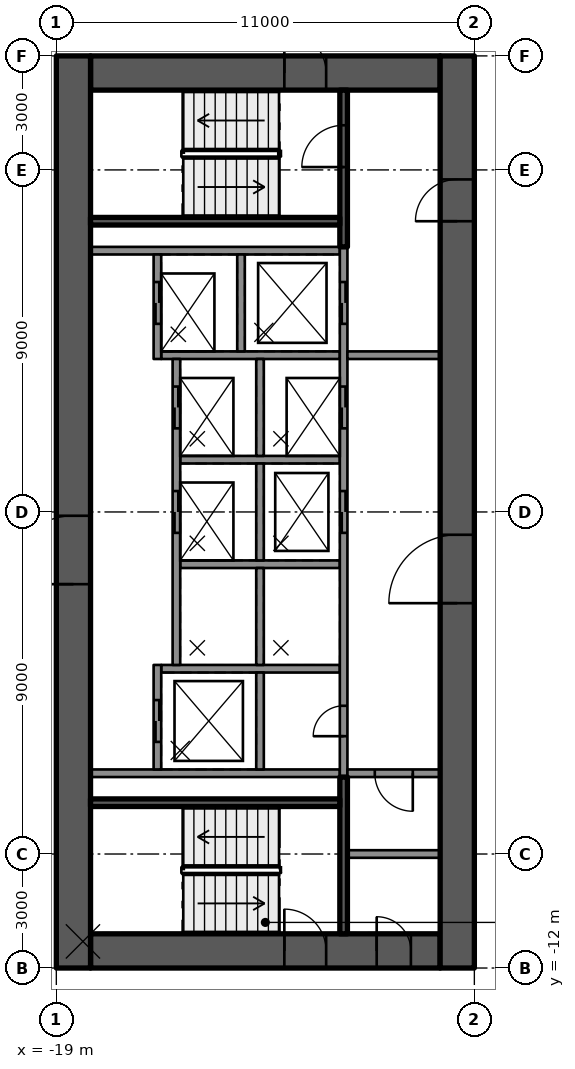
"""IFC4 building model, lengths in metres.
Left out: names, types, materials, properties, quantities, classifications, styles, units other than length and angle.
Written with IfcOpenShell. Run it as: python <this file> out.ifc"""

import sys

from ifc_helpers import new_model, si_unit, direction, frame, frame_2d, origin, place, context, subcontext, project, spatial, rectangle, extrude, element, fill, save


model = new_model("IFC4")
c1 = context("Model", 3, precision=1e-05, world=origin(), true_north=direction((0.0, 1.0)))
c2 = subcontext(c1, "Body", "Model", "MODEL_VIEW")
j1 = project(units=[si_unit("LENGTHUNIT", "METRE"), si_unit("PLANEANGLEUNIT", "RADIAN")], contexts=[c1])
p1 = place(None, origin())
s1 = spatial("IfcSite", under=j1, at=p1, CompositionType="ELEMENT")
p2 = place(p1, origin())
s2 = spatial("IfcBuilding", under=s1, at=p2, CompositionType="ELEMENT")
p3 = place(p2, frame((0.0, 0.0, 40.8)))
s3 = spatial("IfcBuildingStorey", under=s2, at=p3, CompositionType="ELEMENT", Elevation=40.8)
p4 = place(p3, frame((-18.1, 11.55, 0.0), z_axis=(0.0, 0.0, 1.0), x_axis=(1.0, 0.0, 0.0)))
e1 = element("IfcWall", 1, at=p4, inside=s3, PredefinedType="SHEAR", context=c2, shape_type="SweptSolid", body=[
    extrude(rectangle(XDim=9.2, YDim=0.9, at=frame_2d((4.6, 0.0))), origin(), (0.0, 0.0, 1.0), 3.5),
])
p5 = place(p4, frame((5.1, 0.0, 0.0)))
e2 = element("IfcOpeningElement", 2, at=p5, cuts=e1, PredefinedType="OPENING", context=c2, shape_type="SweptSolid", body=[
    extrude(rectangle(XDim=1.1, YDim=2.1, at=frame_2d((0.55, 1.05))), frame((0.0, 0.46, 0.0), z_axis=(0.0, -1.0, 0.0), x_axis=(1.0, 0.0, 0.0)), (0.0, 0.0, 1.0), 0.92),
])
p6 = place(p3, frame((-18.1, -11.55, 0.0), z_axis=(0.0, 0.0, 1.0), x_axis=(1.0, 0.0, 0.0)))
e3 = element("IfcWall", 3, at=p6, inside=s3, PredefinedType="SHEAR", context=c2, shape_type="SweptSolid", body=[
    extrude(rectangle(XDim=9.2, YDim=0.9, at=frame_2d((4.6, 0.0))), origin(), (0.0, 0.0, 1.0), 3.5),
])
p7 = place(p6, frame((5.1, 0.0, 0.0)))
e4 = element("IfcOpeningElement", 4, at=p7, cuts=e3, PredefinedType="OPENING", context=c2, shape_type="SweptSolid", body=[
    extrude(rectangle(XDim=1.1, YDim=2.1, at=frame_2d((0.55, 1.05))), frame((0.0, 0.46, 0.0), z_axis=(0.0, -1.0, 0.0), x_axis=(1.0, 0.0, 0.0)), (0.0, 0.0, 1.0), 0.92),
])
p8 = place(p6, frame((7.53, 0.0, 0.0)))
e5 = element("IfcOpeningElement", 5, at=p8, cuts=e3, PredefinedType="OPENING", context=c2, shape_type="SweptSolid", body=[
    extrude(rectangle(XDim=0.9, YDim=2.1, at=frame_2d((0.45, 1.05))), frame((0.0, 0.46, 0.0), z_axis=(0.0, -1.0, 0.0), x_axis=(1.0, 0.0, 0.0)), (0.0, 0.0, 1.0), 0.92),
])
p9 = place(p3, frame((-18.55, -12.0, 0.0), z_axis=(0.0, 0.0, 1.0), x_axis=(0.0, 1.0, 0.0)))
e6 = element("IfcWall", 6, at=p9, inside=s3, PredefinedType="SHEAR", context=c2, shape_type="SweptSolid", body=[
    extrude(rectangle(XDim=24.0, YDim=0.9, at=frame_2d((12.0, 0.0))), origin(), (0.0, 0.0, 1.0), 3.5),
])
p10 = place(p9, frame((10.1, 0.0, 0.0)))
e7 = element("IfcOpeningElement", 7, at=p10, cuts=e6, PredefinedType="OPENING", context=c2, shape_type="SweptSolid", body=[
    extrude(rectangle(XDim=1.8, YDim=2.1, at=frame_2d((0.9, 1.05))), frame((0.0, 0.46, 0.0), z_axis=(0.0, -1.0, 0.0), x_axis=(1.0, 0.0, 0.0)), (0.0, 0.0, 1.0), 0.92),
])
p11 = place(p3, frame((-8.45, -12.0, 0.0), z_axis=(0.0, 0.0, 1.0), x_axis=(0.0, 1.0, 0.0)))
e8 = element("IfcWall", 8, at=p11, inside=s3, PredefinedType="SHEAR", context=c2, shape_type="SweptSolid", body=[
    extrude(rectangle(XDim=24.0, YDim=0.9, at=frame_2d((12.0, 0.0))), origin(), (0.0, 0.0, 1.0), 3.5),
])
p12 = place(p11, frame((9.6, 0.0, 0.0)))
e9 = element("IfcOpeningElement", 9, at=p12, cuts=e8, PredefinedType="OPENING", context=c2, shape_type="SweptSolid", body=[
    extrude(rectangle(XDim=1.8, YDim=2.1, at=frame_2d((0.9, 1.05))), frame((0.0, 0.46, 0.0), z_axis=(0.0, -1.0, 0.0), x_axis=(1.0, 0.0, 0.0)), (0.0, 0.0, 1.0), 0.92),
])
p13 = place(p11, frame((19.65, 0.0, 0.0)))
e10 = element("IfcOpeningElement", 10, at=p13, cuts=e8, PredefinedType="OPENING", context=c2, shape_type="SweptSolid", body=[
    extrude(rectangle(XDim=1.1, YDim=2.1, at=frame_2d((0.55, 1.05))), frame((0.0, 0.46, 0.0), z_axis=(0.0, -1.0, 0.0), x_axis=(1.0, 0.0, 0.0)), (0.0, 0.0, 1.0), 0.92),
])
for number, where, z_axis, x_axis in (
    (11, (-11.54, 6.875, 0.0), (0.0, 0.0, 1.0), (-1.0, 0.0, 0.0)),
    (12, (-11.54, -6.875, 0.0), (0.0, 0.0, 1.0), (-1.0, 0.0, 0.0)),
):
    element("IfcWall", number, at=place(p3, frame(where, z_axis=z_axis, x_axis=x_axis)), inside=s3, PredefinedType="SOLIDWALL", context=c2, shape_type="SweptSolid", body=[
        extrude(rectangle(XDim=6.56, YDim=0.2, at=frame_2d((3.28, 0.0))), origin(), (0.0, 0.0, 1.0), 3.08),
    ])
p14 = place(p3, frame((-11.54, -4.125, 0.0), z_axis=(0.0, 0.0, 1.0), x_axis=(-1.0, 0.0, 0.0)))
e13 = element("IfcWall", 13, at=p14, inside=s3, PredefinedType="SOLIDWALL", context=c2, shape_type="SweptSolid", body=[
    extrude(rectangle(XDim=4.7, YDim=0.2, at=frame_2d((2.35, 0.0))), origin(), (0.0, 0.0, 1.0), 3.08),
])
for number, where, z_axis, x_axis in (
    (14, (-11.54, -1.375, 0.0), (0.0, 0.0, 1.0), (-1.0, 0.0, 0.0)),
    (15, (-11.54, 1.375, 0.0), (0.0, 0.0, 1.0), (-1.0, 0.0, 0.0)),
):
    element("IfcWall", number, at=place(p3, frame(where, z_axis=z_axis, x_axis=x_axis)), inside=s3, PredefinedType="SOLIDWALL", context=c2, shape_type="SweptSolid", body=[
        extrude(rectangle(XDim=4.2, YDim=0.2, at=frame_2d((2.1, 0.0))), origin(), (0.0, 0.0, 1.0), 3.08),
    ])
p15 = place(p3, frame((-11.54, 4.125, 0.0), z_axis=(0.0, 0.0, 1.0), x_axis=(-1.0, 0.0, 0.0)))
e16 = element("IfcWall", 16, at=p15, inside=s3, PredefinedType="SOLIDWALL", context=c2, shape_type="SweptSolid", body=[
    extrude(rectangle(XDim=4.7, YDim=0.2, at=frame_2d((2.35, 0.0))), origin(), (0.0, 0.0, 1.0), 3.08),
])
p16 = place(p3, frame((-11.44, -6.975, 0.0), z_axis=(0.0, 0.0, 1.0), x_axis=(0.0, 1.0, 0.0)))
e17 = element("IfcWall", 17, at=p16, inside=s3, PredefinedType="SOLIDWALL", context=c2, shape_type="SweptSolid", body=[
    extrude(rectangle(XDim=13.95, YDim=0.2, at=frame_2d((6.975, 0.0))), origin(), (0.0, 0.0, 1.0), 3.08),
])
p17 = place(p16, frame((6.425, 0.0, 0.0)))
e18 = element("IfcOpeningElement", 18, at=p17, cuts=e17, PredefinedType="OPENING", context=c2, shape_type="SweptSolid", body=[
    extrude(rectangle(XDim=1.1, YDim=2.1, at=frame_2d((0.55, 1.05))), frame((0.0, 0.11, 0.0), z_axis=(0.0, -1.0, 0.0), x_axis=(1.0, 0.0, 0.0)), (0.0, 0.0, 1.0), 0.22),
])
p18 = place(p16, frame((9.175, 0.0, 0.0)))
e19 = element("IfcOpeningElement", 19, at=p18, cuts=e17, PredefinedType="OPENING", context=c2, shape_type="SweptSolid", body=[
    extrude(rectangle(XDim=1.1, YDim=2.1, at=frame_2d((0.55, 1.05))), frame((0.0, 0.11, 0.0), z_axis=(0.0, -1.0, 0.0), x_axis=(1.0, 0.0, 0.0)), (0.0, 0.0, 1.0), 0.22),
])
p19 = place(p16, frame((11.925, 0.0, 0.0)))
e20 = element("IfcOpeningElement", 20, at=p19, cuts=e17, PredefinedType="OPENING", context=c2, shape_type="SweptSolid", body=[
    extrude(rectangle(XDim=1.1, YDim=2.1, at=frame_2d((0.55, 1.05))), frame((0.0, 0.11, 0.0), z_axis=(0.0, -1.0, 0.0), x_axis=(1.0, 0.0, 0.0)), (0.0, 0.0, 1.0), 0.22),
])
p20 = place(p16, frame((1.075, 0.0, 0.0)))
e21 = element("IfcOpeningElement", 21, at=p20, cuts=e17, PredefinedType="OPENING", context=c2, shape_type="SweptSolid", body=[
    extrude(rectangle(XDim=0.8, YDim=2.1, at=frame_2d((0.4, 1.05))), frame((0.0, 0.11, 0.0), z_axis=(0.0, -1.0, 0.0), x_axis=(1.0, 0.0, 0.0)), (0.0, 0.0, 1.0), 0.22),
])
for number, where, z_axis, x_axis in (
    (22, (-13.64, -6.775, 0.0), (0.0, 0.0, 1.0), (0.0, 1.0, 0.0)),
    (23, (-13.64, -4.025, 0.0), (0.0, 0.0, 1.0), (0.0, 1.0, 0.0)),
    (24, (-13.64, -1.275, 0.0), (0.0, 0.0, 1.0), (0.0, 1.0, 0.0)),
    (25, (-13.64, 1.475, 0.0), (0.0, 0.0, 1.0), (0.0, 1.0, 0.0)),
    (26, (-14.14, 4.225, 0.0), (0.0, 0.0, 1.0), (0.0, 1.0, 0.0)),
):
    element("IfcWall", number, at=place(p3, frame(where, z_axis=z_axis, x_axis=x_axis)), inside=s3, PredefinedType="SOLIDWALL", context=c2, shape_type="SweptSolid", body=[
        extrude(rectangle(XDim=2.55, YDim=0.2, at=frame_2d((1.275, 0.0))), origin(), (0.0, 0.0, 1.0), 3.08),
    ])
p21 = place(p3, frame((-16.34, -6.775, 0.0), z_axis=(0.0, 0.0, 1.0), x_axis=(0.0, 1.0, 0.0)))
e27 = element("IfcWall", 27, at=p21, inside=s3, PredefinedType="SOLIDWALL", context=c2, shape_type="SweptSolid", body=[
    extrude(rectangle(XDim=2.75, YDim=0.2, at=frame_2d((1.375, 0.0))), origin(), (0.0, 0.0, 1.0), 3.08),
])
p22 = place(p21, frame((0.725, 0.0, 0.0)))
e28 = element("IfcOpeningElement", 28, at=p22, cuts=e27, PredefinedType="OPENING", context=c2, shape_type="SweptSolid", body=[
    extrude(rectangle(XDim=1.1, YDim=2.1, at=frame_2d((0.55, 1.05))), frame((0.0, 0.11, 0.0), z_axis=(0.0, -1.0, 0.0), x_axis=(1.0, 0.0, 0.0)), (0.0, 0.0, 1.0), 0.22),
])
p23 = place(p3, frame((-15.84, -4.025, 0.0), z_axis=(0.0, 0.0, 1.0), x_axis=(0.0, 1.0, 0.0)))
e29 = element("IfcWall", 29, at=p23, inside=s3, PredefinedType="SOLIDWALL", context=c2, shape_type="SweptSolid", body=[
    extrude(rectangle(XDim=8.05, YDim=0.2, at=frame_2d((4.025, 0.0))), origin(), (0.0, 0.0, 1.0), 3.08),
])
p24 = place(p23, frame((3.475, 0.0, 0.0)))
e30 = element("IfcOpeningElement", 30, at=p24, cuts=e29, PredefinedType="OPENING", context=c2, shape_type="SweptSolid", body=[
    extrude(rectangle(XDim=1.1, YDim=2.1, at=frame_2d((0.55, 1.05))), frame((0.0, 0.11, 0.0), z_axis=(0.0, -1.0, 0.0), x_axis=(1.0, 0.0, 0.0)), (0.0, 0.0, 1.0), 0.22),
])
p25 = place(p23, frame((6.225, 0.0, 0.0)))
e31 = element("IfcOpeningElement", 31, at=p25, cuts=e29, PredefinedType="OPENING", context=c2, shape_type="SweptSolid", body=[
    extrude(rectangle(XDim=1.1, YDim=2.1, at=frame_2d((0.55, 1.05))), frame((0.0, 0.11, 0.0), z_axis=(0.0, -1.0, 0.0), x_axis=(1.0, 0.0, 0.0)), (0.0, 0.0, 1.0), 0.22),
])
p26 = place(p3, frame((-16.34, 4.025, 0.0), z_axis=(0.0, 0.0, 1.0), x_axis=(0.0, 1.0, 0.0)))
e32 = element("IfcWall", 32, at=p26, inside=s3, PredefinedType="SOLIDWALL", context=c2, shape_type="SweptSolid", body=[
    extrude(rectangle(XDim=2.75, YDim=0.2, at=frame_2d((1.375, 0.0))), origin(), (0.0, 0.0, 1.0), 3.08),
])
p27 = place(p26, frame((0.925, 0.0, 0.0)))
e33 = element("IfcOpeningElement", 33, at=p27, cuts=e32, PredefinedType="OPENING", context=c2, shape_type="SweptSolid", body=[
    extrude(rectangle(XDim=1.1, YDim=2.1, at=frame_2d((0.55, 1.05))), frame((0.0, 0.11, 0.0), z_axis=(0.0, -1.0, 0.0), x_axis=(1.0, 0.0, 0.0)), (0.0, 0.0, 1.0), 0.22),
])
p28 = place(p3, frame((-11.44, 6.975, 0.0), z_axis=(0.0, 0.0, 1.0), x_axis=(0.0, 1.0, 0.0)))
e34 = element("IfcWall", 34, at=p28, inside=s3, PredefinedType="SOLIDWALL", context=c2, shape_type="SweptSolid", body=[
    extrude(rectangle(XDim=4.125, YDim=0.2, at=frame_2d((2.062, 0.0))), origin(), (0.0, 0.0, 1.0), 3.08),
])
p29 = place(p28, frame((2.1, 0.0, 0.0)))
e35 = element("IfcOpeningElement", 35, at=p29, cuts=e34, PredefinedType="OPENING", context=c2, shape_type="SweptSolid", body=[
    extrude(rectangle(XDim=1.1, YDim=2.1, at=frame_2d((0.55, 1.05))), frame((0.0, 0.11, 0.0), z_axis=(0.0, -1.0, 0.0), x_axis=(1.0, 0.0, 0.0)), (0.0, 0.0, 1.0), 0.22),
])
p30 = place(p3, frame((-11.54, 7.65, 0.0), z_axis=(0.0, 0.0, 1.0), x_axis=(-1.0, 0.0, 0.0)))
e36 = element("IfcWall", 36, at=p30, inside=s3, PredefinedType="SOLIDWALL", context=c2, shape_type="SweptSolid", body=[
    extrude(rectangle(XDim=6.56, YDim=0.2, at=frame_2d((3.28, 0.0))), origin(), (0.0, 0.0, 1.0), 3.08),
])
p31 = place(p3, frame((-11.44, -11.1, 0.0), z_axis=(0.0, 0.0, 1.0), x_axis=(0.0, 1.0, 0.0)))
e37 = element("IfcWall", 37, at=p31, inside=s3, PredefinedType="SOLIDWALL", context=c2, shape_type="SweptSolid", body=[
    extrude(rectangle(XDim=4.125, YDim=0.2, at=frame_2d((2.062, 0.0))), origin(), (0.0, 0.0, 1.0), 3.08),
])
p32 = place(p3, frame((-11.54, -7.65, 0.0), z_axis=(0.0, 0.0, 1.0), x_axis=(-1.0, 0.0, 0.0)))
e38 = element("IfcWall", 38, at=p32, inside=s3, PredefinedType="SOLIDWALL", context=c2, shape_type="SweptSolid", body=[
    extrude(rectangle(XDim=6.56, YDim=0.2, at=frame_2d((3.28, 0.0))), origin(), (0.0, 0.0, 1.0), 3.08),
])
p33 = place(p3, frame((-8.9, 4.125, 0.0), z_axis=(0.0, 0.0, 1.0), x_axis=(-1.0, 0.0, 0.0)))
e39 = element("IfcWall", 39, at=p33, inside=s3, PredefinedType="PARTITIONING", context=c2, shape_type="SweptSolid", body=[
    extrude(rectangle(XDim=2.44, YDim=0.2, at=frame_2d((1.22, 0.0))), origin(), (0.0, 0.0, 1.0), 3.08),
])
p34 = place(p3, frame((-8.9, -6.875, 0.0), z_axis=(0.0, 0.0, 1.0), x_axis=(-1.0, 0.0, 0.0)))
e40 = element("IfcWall", 40, at=p34, inside=s3, PredefinedType="PARTITIONING", context=c2, shape_type="SweptSolid", body=[
    extrude(rectangle(XDim=2.44, YDim=0.2, at=frame_2d((1.22, 0.0))), origin(), (0.0, 0.0, 1.0), 3.08),
])
p35 = place(p34, frame((0.72, 0.0, 0.0)))
e41 = element("IfcOpeningElement", 41, at=p35, cuts=e40, PredefinedType="OPENING", context=c2, shape_type="SweptSolid", body=[
    extrude(rectangle(XDim=1.0, YDim=2.1, at=frame_2d((0.5, 1.05))), frame((0.0, 0.11, 0.0), z_axis=(0.0, -1.0, 0.0), x_axis=(1.0, 0.0, 0.0)), (0.0, 0.0, 1.0), 0.22),
])
p36 = place(p3, frame((-8.9, -9.0, 0.0), z_axis=(0.0, 0.0, 1.0), x_axis=(-1.0, 0.0, 0.0)))
e42 = element("IfcWall", 42, at=p36, inside=s3, PredefinedType="PARTITIONING", context=c2, shape_type="SweptSolid", body=[
    extrude(rectangle(XDim=2.44, YDim=0.2, at=frame_2d((1.22, 0.0))), origin(), (0.0, 0.0, 1.0), 3.08),
])
p37 = place(p22, origin())
e43 = element("IfcDoor", 43, at=p37, inside=s3, OperationType="DOUBLE_DOOR_SLIDING", PredefinedType="DOOR", context=c2, shape_type="SweptSolid", body=[
    extrude(rectangle(XDim=1.1, YDim=2.1, at=frame_2d((0.55, 1.05))), frame((0.0, 0.025, 0.0), z_axis=(0.0, -1.0, 0.0), x_axis=(1.0, 0.0, 0.0)), (0.0, 0.0, 1.0), 0.05),
])
fill(e28, e43)
p38 = place(p17, origin())
e44 = element("IfcDoor", 44, at=p38, inside=s3, OperationType="DOUBLE_DOOR_SLIDING", PredefinedType="DOOR", context=c2, shape_type="SweptSolid", body=[
    extrude(rectangle(XDim=1.1, YDim=2.1, at=frame_2d((0.55, 1.05))), frame((0.0, 0.025, 0.0), z_axis=(0.0, -1.0, 0.0), x_axis=(1.0, 0.0, 0.0)), (0.0, 0.0, 1.0), 0.05),
])
fill(e18, e44)
p39 = place(p24, origin())
e45 = element("IfcDoor", 45, at=p39, inside=s3, OperationType="DOUBLE_DOOR_SLIDING", PredefinedType="DOOR", context=c2, shape_type="SweptSolid", body=[
    extrude(rectangle(XDim=1.1, YDim=2.1, at=frame_2d((0.55, 1.05))), frame((0.0, 0.025, 0.0), z_axis=(0.0, -1.0, 0.0), x_axis=(1.0, 0.0, 0.0)), (0.0, 0.0, 1.0), 0.05),
])
fill(e30, e45)
p40 = place(p18, origin())
e46 = element("IfcDoor", 46, at=p40, inside=s3, OperationType="DOUBLE_DOOR_SLIDING", PredefinedType="DOOR", context=c2, shape_type="SweptSolid", body=[
    extrude(rectangle(XDim=1.1, YDim=2.1, at=frame_2d((0.55, 1.05))), frame((0.0, 0.025, 0.0), z_axis=(0.0, -1.0, 0.0), x_axis=(1.0, 0.0, 0.0)), (0.0, 0.0, 1.0), 0.05),
])
fill(e19, e46)
p41 = place(p25, origin())
e47 = element("IfcDoor", 47, at=p41, inside=s3, OperationType="DOUBLE_DOOR_SLIDING", PredefinedType="DOOR", context=c2, shape_type="SweptSolid", body=[
    extrude(rectangle(XDim=1.1, YDim=2.1, at=frame_2d((0.55, 1.05))), frame((0.0, 0.025, 0.0), z_axis=(0.0, -1.0, 0.0), x_axis=(1.0, 0.0, 0.0)), (0.0, 0.0, 1.0), 0.05),
])
fill(e31, e47)
p42 = place(p19, origin())
e48 = element("IfcDoor", 48, at=p42, inside=s3, OperationType="DOUBLE_DOOR_SLIDING", PredefinedType="DOOR", context=c2, shape_type="SweptSolid", body=[
    extrude(rectangle(XDim=1.1, YDim=2.1, at=frame_2d((0.55, 1.05))), frame((0.0, 0.025, 0.0), z_axis=(0.0, -1.0, 0.0), x_axis=(1.0, 0.0, 0.0)), (0.0, 0.0, 1.0), 0.05),
])
fill(e20, e48)
p43 = place(p27, origin())
e49 = element("IfcDoor", 49, at=p43, inside=s3, OperationType="DOUBLE_DOOR_SLIDING", PredefinedType="DOOR", context=c2, shape_type="SweptSolid", body=[
    extrude(rectangle(XDim=1.1, YDim=2.1, at=frame_2d((0.55, 1.05))), frame((0.0, 0.025, 0.0), z_axis=(0.0, -1.0, 0.0), x_axis=(1.0, 0.0, 0.0)), (0.0, 0.0, 1.0), 0.05),
])
fill(e33, e49)
p44 = place(p20, origin())
e50 = element("IfcDoor", 50, at=p44, inside=s3, OperationType="SINGLE_SWING_LEFT", PredefinedType="DOOR", context=c2, shape_type="SweptSolid", body=[
    extrude(rectangle(XDim=0.8, YDim=2.1, at=frame_2d((0.4, 1.05))), frame((0.0, 0.025, 0.0), z_axis=(0.0, -1.0, 0.0), x_axis=(1.0, 0.0, 0.0)), (0.0, 0.0, 1.0), 0.05),
])
fill(e21, e50)
p45 = place(p12, origin())
e51 = element("IfcDoor", 51, at=p45, inside=s3, OperationType="SINGLE_SWING_LEFT", PredefinedType="DOOR", context=c2, shape_type="SweptSolid", body=[
    extrude(rectangle(XDim=1.8, YDim=2.1, at=frame_2d((0.9, 1.05))), frame((0.0, 0.025, 0.0), z_axis=(0.0, -1.0, 0.0), x_axis=(1.0, 0.0, 0.0)), (0.0, 0.0, 1.0), 0.05),
])
fill(e9, e51)
p46 = place(p10, origin())
e52 = element("IfcDoor", 52, at=p46, inside=s3, OperationType="SINGLE_SWING_LEFT", PredefinedType="DOOR", context=c2, shape_type="SweptSolid", body=[
    extrude(rectangle(XDim=1.8, YDim=2.1, at=frame_2d((0.9, 1.05))), frame((0.0, 0.025, 0.0), z_axis=(0.0, -1.0, 0.0), x_axis=(1.0, 0.0, 0.0)), (0.0, 0.0, 1.0), 0.05),
])
fill(e7, e52)
p47 = place(p13, origin())
e53 = element("IfcDoor", 53, at=p47, inside=s3, OperationType="SINGLE_SWING_RIGHT", PredefinedType="DOOR", context=c2, shape_type="SweptSolid", body=[
    extrude(rectangle(XDim=1.1, YDim=2.1, at=frame_2d((0.55, 1.05))), frame((0.0, 0.025, 0.0), z_axis=(0.0, -1.0, 0.0), x_axis=(1.0, 0.0, 0.0)), (0.0, 0.0, 1.0), 0.05),
])
fill(e10, e53)
p48 = place(p5, origin())
e54 = element("IfcDoor", 54, at=p48, inside=s3, OperationType="SINGLE_SWING_RIGHT", PredefinedType="DOOR", context=c2, shape_type="SweptSolid", body=[
    extrude(rectangle(XDim=1.1, YDim=2.1, at=frame_2d((0.55, 1.05))), frame((0.0, 0.025, 0.0), z_axis=(0.0, -1.0, 0.0), x_axis=(1.0, 0.0, 0.0)), (0.0, 0.0, 1.0), 0.05),
])
fill(e2, e54)
p49 = place(p7, origin())
e55 = element("IfcDoor", 55, at=p49, inside=s3, OperationType="SINGLE_SWING_RIGHT", PredefinedType="DOOR", context=c2, shape_type="SweptSolid", body=[
    extrude(rectangle(XDim=1.1, YDim=2.1, at=frame_2d((0.55, 1.05))), frame((0.0, 0.025, 0.0), z_axis=(0.0, -1.0, 0.0), x_axis=(1.0, 0.0, 0.0)), (0.0, 0.0, 1.0), 0.05),
])
fill(e4, e55)
p50 = place(p29, origin())
e56 = element("IfcDoor", 56, at=p50, inside=s3, OperationType="SINGLE_SWING_RIGHT", PredefinedType="DOOR", context=c2, shape_type="SweptSolid", body=[
    extrude(rectangle(XDim=1.1, YDim=2.1, at=frame_2d((0.55, 1.05))), frame((0.0, 0.025, 0.0), z_axis=(0.0, -1.0, 0.0), x_axis=(1.0, 0.0, 0.0)), (0.0, 0.0, 1.0), 0.05),
])
fill(e35, e56)
p51 = place(p8, origin())
e57 = element("IfcDoor", 57, at=p51, inside=s3, OperationType="SINGLE_SWING_RIGHT", PredefinedType="DOOR", context=c2, shape_type="SweptSolid", body=[
    extrude(rectangle(XDim=0.9, YDim=2.1, at=frame_2d((0.45, 1.05))), frame((0.0, 0.025, 0.0), z_axis=(0.0, -1.0, 0.0), x_axis=(1.0, 0.0, 0.0)), (0.0, 0.0, 1.0), 0.05),
])
fill(e5, e57)
p52 = place(p35, origin())
e58 = element("IfcDoor", 58, at=p52, inside=s3, OperationType="SINGLE_SWING_RIGHT", PredefinedType="DOOR", context=c2, shape_type="SweptSolid", body=[
    extrude(rectangle(XDim=1.0, YDim=2.1, at=frame_2d((0.5, 1.05))), frame((0.0, 0.025, 0.0), z_axis=(0.0, -1.0, 0.0), x_axis=(1.0, 0.0, 0.0)), (0.0, 0.0, 1.0), 0.05),
])
fill(e41, e58)
save(model, sys.argv[1])
